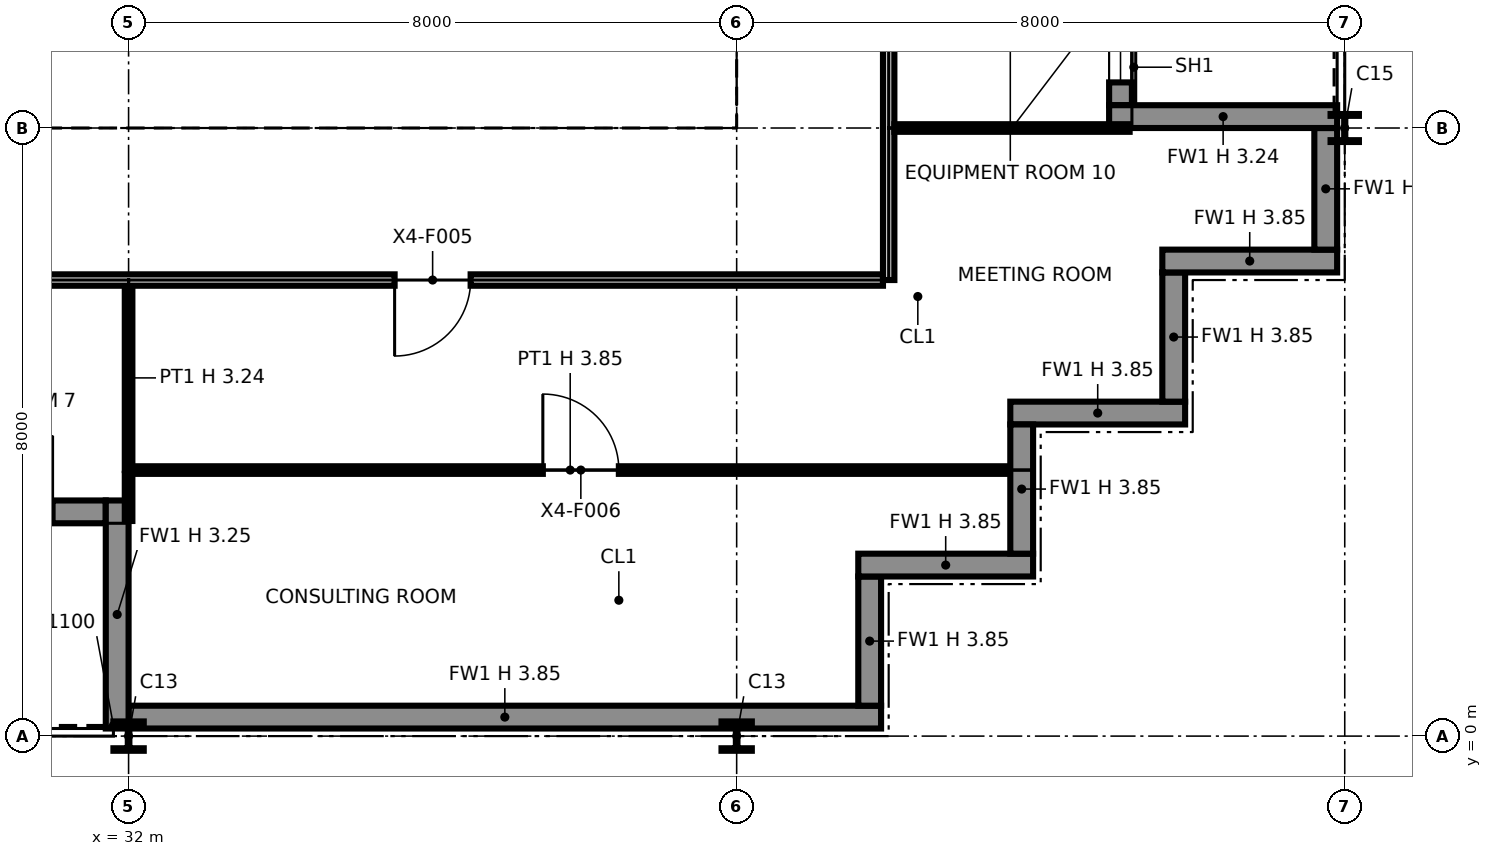
"""IFC4 building model, lengths in metres.
Left out: names, types, materials, properties, quantities, classifications, styles, units other than length and angle.
Written with IfcOpenShell. Run it as: python <this file> out.ifc"""

import sys

from ifc_helpers import new_model, si_unit, direction, frame, frame_2d, origin, origin_2d, place, context, subcontext, project, spatial, polyline, rectangle, i_section, outline, extrude, element, fill, save


model = new_model("IFC4")
c1 = context("Model", 3, precision=1e-05, world=origin(), true_north=direction((0.0, 1.0)))
c2 = subcontext(c1, "Body", "Model", "MODEL_VIEW")
j1 = project(units=[si_unit("LENGTHUNIT", "METRE"), si_unit("PLANEANGLEUNIT", "RADIAN")], contexts=[c1])
p1 = place(None, origin())
s1 = spatial("IfcSite", under=j1, at=p1, CompositionType="ELEMENT")
p2 = place(p1, origin())
s2 = spatial("IfcBuilding", under=s1, at=p2, CompositionType="ELEMENT")
p3 = place(p2, frame((0.0, 0.0, 275.0)))
s3 = spatial("IfcBuildingStorey", under=s2, at=p3, CompositionType="ELEMENT", Elevation=275.0)
p4 = place(p3, frame((32.0, 0.0, 0.0), z_axis=(0.0, 0.0, 1.0), x_axis=(1.0, 0.0, 0.0)))
e1 = element("IfcColumn", 1, at=p4, inside=s3, PredefinedType="COLUMN", context=c2, shape_type="SweptSolid", body=[
    extrude(i_section(OverallWidth=0.399, OverallDepth=0.386, WebThickness=0.021, FlangeThickness=0.033, at=origin_2d()), origin(), (0.0, 0.0, 1.0), 3.85),
])
p5 = place(p3, frame((32.0, 8.0, 0.0), z_axis=(0.0, 0.0, 1.0), x_axis=(1.0, 0.0, 0.0)))
e2 = element("IfcColumn", 2, at=p5, inside=s3, PredefinedType="COLUMN", context=c2, shape_type="SweptSolid", body=[
    extrude(i_section(OverallWidth=0.257, OverallDepth=0.363, WebThickness=0.013, FlangeThickness=0.022, at=origin_2d()), origin(), (0.0, 0.0, 1.0), 3.85),
])
p6 = place(p3, frame((40.0, 0.0, 0.0), z_axis=(0.0, 0.0, 1.0), x_axis=(1.0, 0.0, 0.0)))
e3 = element("IfcColumn", 3, at=p6, inside=s3, PredefinedType="COLUMN", context=c2, shape_type="SweptSolid", body=[
    extrude(i_section(OverallWidth=0.399, OverallDepth=0.386, WebThickness=0.021, FlangeThickness=0.033, at=origin_2d()), origin(), (0.0, 0.0, 1.0), 3.85),
])
p7 = place(p3, frame((40.0, 8.0, 0.0), z_axis=(0.0, 0.0, 1.0), x_axis=(1.0, 0.0, 0.0)))
e4 = element("IfcColumn", 4, at=p7, inside=s3, PredefinedType="COLUMN", context=c2, shape_type="SweptSolid", body=[
    extrude(i_section(OverallWidth=0.257, OverallDepth=0.363, WebThickness=0.013, FlangeThickness=0.022, at=origin_2d()), origin(), (0.0, 0.0, 1.0), 3.85),
])
p8 = place(p3, frame((48.0, 8.0, 0.0), z_axis=(0.0, 0.0, 1.0), x_axis=(1.0, 0.0, 0.0)))
e5 = element("IfcColumn", 5, at=p8, inside=s3, PredefinedType="COLUMN", context=c2, shape_type="SweptSolid", body=[
    extrude(i_section(OverallWidth=0.373, OverallDepth=0.368, WebThickness=0.015, FlangeThickness=0.024, at=origin_2d()), origin(), (0.0, 0.0, 1.0), 3.85),
])
p9 = place(p3, frame((24.3, 2.95, 0.0), z_axis=(0.0, 0.0, 1.0), x_axis=(1.0, 0.0, 0.0)))
e6 = element("IfcWall", 6, at=p9, inside=s3, PredefinedType="SOLIDWALL", context=c2, shape_type="SweptSolid", body=[
    extrude(rectangle(XDim=7.4, YDim=0.3, at=frame_2d((3.7, 0.0))), origin(), (0.0, 0.0, 1.0), 3.85),
])
p10 = place(p9, frame((0.3, 0.0, 0.9)))
e7 = element("IfcOpeningElement", 7, at=p10, cuts=e6, PredefinedType="OPENING", context=c2, shape_type="SweptSolid", body=[
    extrude(rectangle(XDim=2.8, YDim=2.2, at=frame_2d((1.4, 1.1))), frame((0.0, 0.16, 0.0), z_axis=(0.0, -1.0, 0.0), x_axis=(1.0, 0.0, 0.0)), (0.0, 0.0, 1.0), 0.32),
])
p11 = place(p9, frame((4.7, 0.0, 0.0)))
e8 = element("IfcOpeningElement", 8, at=p11, cuts=e6, PredefinedType="OPENING", context=c2, shape_type="SweptSolid", body=[
    extrude(rectangle(XDim=2.0, YDim=2.4, at=frame_2d((1.0, 1.2))), frame((0.0, 0.16, 0.0), z_axis=(0.0, -1.0, 0.0), x_axis=(1.0, 0.0, 0.0)), (0.0, 0.0, 1.0), 0.32),
])
p12 = place(p3, frame((31.85, 0.1, 0.0), z_axis=(0.0, 0.0, 1.0), x_axis=(0.0, 1.0, 0.0)))
e9 = element("IfcWall", 9, at=p12, inside=s3, PredefinedType="SOLIDWALL", context=c2, shape_type="SweptSolid", body=[
    extrude(rectangle(XDim=3.0, YDim=0.3, at=frame_2d((1.5, 0.0))), origin(), (0.0, 0.0, 1.0), 3.247),
])
p13 = place(p3, frame((32.0, 0.25, 0.0), z_axis=(0.0, 0.0, 1.0), x_axis=(1.0, 0.0, 0.0)))
e10 = element("IfcWall", 10, at=p13, inside=s3, PredefinedType="SOLIDWALL", context=c2, shape_type="SweptSolid", body=[
    extrude(rectangle(XDim=9.9, YDim=0.3, at=frame_2d((4.95, 0.0))), origin(), (0.0, 0.0, 1.0), 3.85),
])
p14 = place(p3, frame((41.75, 0.4, 0.0), z_axis=(0.0, 0.0, 1.0), x_axis=(0.0, 1.0, 0.0)))
e11 = element("IfcWall", 11, at=p14, inside=s3, PredefinedType="SOLIDWALL", context=c2, shape_type="SweptSolid", body=[
    extrude(rectangle(XDim=1.7, YDim=0.3, at=frame_2d((0.85, 0.0))), origin(), (0.0, 0.0, 1.0), 3.85),
])
p15 = place(p3, frame((41.6, 2.25, 0.0), z_axis=(0.0, 0.0, 1.0), x_axis=(1.0, 0.0, 0.0)))
e12 = element("IfcWall", 12, at=p15, inside=s3, PredefinedType="SOLIDWALL", context=c2, shape_type="SweptSolid", body=[
    extrude(rectangle(XDim=2.3, YDim=0.3, at=frame_2d((1.15, 0.0))), origin(), (0.0, 0.0, 1.0), 3.85),
])
p16 = place(p3, frame((43.75, 2.4, 0.0), z_axis=(0.0, 0.0, 1.0), x_axis=(0.0, 1.0, 0.0)))
e13 = element("IfcWall", 13, at=p16, inside=s3, PredefinedType="SOLIDWALL", context=c2, shape_type="SweptSolid", body=[
    extrude(rectangle(XDim=1.7, YDim=0.3, at=frame_2d((0.85, 0.0))), origin(), (0.0, 0.0, 1.0), 3.85),
])
p17 = place(p3, frame((43.6, 4.25, 0.0), z_axis=(0.0, 0.0, 1.0), x_axis=(1.0, 0.0, 0.0)))
e14 = element("IfcWall", 14, at=p17, inside=s3, PredefinedType="SOLIDWALL", context=c2, shape_type="SweptSolid", body=[
    extrude(rectangle(XDim=2.3, YDim=0.3, at=frame_2d((1.15, 0.0))), origin(), (0.0, 0.0, 1.0), 3.85),
])
p18 = place(p3, frame((45.75, 4.4, 0.0), z_axis=(0.0, 0.0, 1.0), x_axis=(0.0, 1.0, 0.0)))
e15 = element("IfcWall", 15, at=p18, inside=s3, PredefinedType="SOLIDWALL", context=c2, shape_type="SweptSolid", body=[
    extrude(rectangle(XDim=1.7, YDim=0.3, at=frame_2d((0.85, 0.0))), origin(), (0.0, 0.0, 1.0), 3.85),
])
p19 = place(p3, frame((45.6, 6.25, 0.0), z_axis=(0.0, 0.0, 1.0), x_axis=(1.0, 0.0, 0.0)))
e16 = element("IfcWall", 16, at=p19, inside=s3, PredefinedType="SOLIDWALL", context=c2, shape_type="SweptSolid", body=[
    extrude(rectangle(XDim=2.3, YDim=0.3, at=frame_2d((1.15, 0.0))), origin(), (0.0, 0.0, 1.0), 3.85),
])
p20 = place(p3, frame((47.75, 6.4, 0.0), z_axis=(0.0, 0.0, 1.0), x_axis=(0.0, 1.0, 0.0)))
e17 = element("IfcWall", 17, at=p20, inside=s3, PredefinedType="SOLIDWALL", context=c2, shape_type="SweptSolid", body=[
    extrude(rectangle(XDim=1.6, YDim=0.3, at=frame_2d((0.8, 0.0))), origin(), (0.0, 0.0, 1.0), 3.85),
])
p21 = place(p3, frame((45.05, 8.3, 0.0), z_axis=(0.0, 0.0, 1.0), x_axis=(0.0, 1.0, 0.0)))
e18 = element("IfcWall", 18, at=p21, inside=s3, PredefinedType="SOLIDWALL", context=c2, shape_type="SweptSolid", body=[
    extrude(rectangle(XDim=7.4, YDim=0.3, at=frame_2d((3.7, 0.0))), origin(), (0.0, 0.0, 1.0), 3.85),
])
p22 = place(p21, frame((0.3, 0.0, 0.9)))
e19 = element("IfcOpeningElement", 19, at=p22, cuts=e18, PredefinedType="OPENING", context=c2, shape_type="SweptSolid", body=[
    extrude(rectangle(XDim=2.8, YDim=2.2, at=frame_2d((1.4, 1.1))), frame((0.0, 0.16, 0.0), z_axis=(0.0, -1.0, 0.0), x_axis=(1.0, 0.0, 0.0)), (0.0, 0.0, 1.0), 0.32),
])
p23 = place(p21, frame((4.7, 0.0, 0.0)))
e20 = element("IfcOpeningElement", 20, at=p23, cuts=e18, PredefinedType="OPENING", context=c2, shape_type="SweptSolid", body=[
    extrude(rectangle(XDim=2.0, YDim=2.4, at=frame_2d((1.0, 1.2))), frame((0.0, 0.16, 0.0), z_axis=(0.0, -1.0, 0.0), x_axis=(1.0, 0.0, 0.0)), (0.0, 0.0, 1.0), 0.32),
])
p24 = place(p3, frame((47.9, 8.15, 0.0), z_axis=(0.0, 0.0, 1.0), x_axis=(-1.0, 0.0, 0.0)))
e21 = element("IfcWall", 21, at=p24, inside=s3, PredefinedType="SOLIDWALL", context=c2, shape_type="SweptSolid", body=[
    extrude(rectangle(XDim=3.0, YDim=0.3, at=frame_2d((1.5, 0.0))), origin(), (0.0, 0.0, 1.0), 3.237),
])
p25 = place(p3, frame((24.65, 8.75, 0.0), z_axis=(0.0, 0.0, 1.0), x_axis=(1.0, 0.0, 0.0)))
e22 = element("IfcWall", 22, at=p25, inside=s3, PredefinedType="PARTITIONING", context=c2, shape_type="SweptSolid", body=[
    extrude(outline(polyline([(0.0, 0.0), (14.7, 0.0), (14.7, 3.85), (7.438, 3.85), (7.437, 3.318), (7.263, 3.318), (7.262, 3.85), (0.0, 3.85), (0.0, 0.0)])), frame((0.0, 0.1, 0.0), z_axis=(0.0, -1.0, 0.0), x_axis=(1.0, 0.0, 0.0)), (0.0, 0.0, 1.0), 0.2),
])
p26 = place(p3, frame((32.0, 8.85, 0.0), z_axis=(0.0, 0.0, 1.0), x_axis=(0.0, 1.0, 0.0)))
e23 = element("IfcWall", 23, at=p26, inside=s3, PredefinedType="PARTITIONING", context=c2, shape_type="SweptSolid", body=[
    extrude(rectangle(XDim=2.55, YDim=0.6, at=frame_2d((1.275, 0.0))), origin(), (0.0, 0.0, 1.0), 3.318),
])
for number, where, z_axis, x_axis in (
    (24, (35.6, 8.85, 0.0), (0.0, 0.0, 1.0), (0.0, 1.0, 0.0)),
    (25, (39.25, 8.85, 0.0), (0.0, 0.0, 1.0), (0.0, 1.0, 0.0)),
):
    element("IfcWall", number, at=place(p3, frame(where, z_axis=z_axis, x_axis=x_axis)), inside=s3, PredefinedType="PARTITIONING", context=c2, shape_type="SweptSolid", body=[
        extrude(rectangle(XDim=6.3, YDim=0.2, at=frame_2d((3.15, 0.0))), origin(), (0.0, 0.0, 1.0), 3.85),
    ])
p27 = place(p3, frame((32.0, 2.83, 0.0), z_axis=(0.0, 0.0, 1.0), x_axis=(0.0, 1.0, 0.0)))
e26 = element("IfcWall", 26, at=p27, inside=s3, PredefinedType="PARTITIONING", context=c2, shape_type="SweptSolid", body=[
    extrude(rectangle(XDim=0.62, YDim=0.1, at=frame_2d((0.31, 0.0))), origin(), (0.0, 0.0, 1.0), 3.238),
])
p28 = place(p3, frame((32.05, 3.5, 0.0), z_axis=(0.0, 0.0, 1.0), x_axis=(1.0, 0.0, 0.0)))
e27 = element("IfcWall", 27, at=p28, inside=s3, PredefinedType="PARTITIONING", context=c2, shape_type="SweptSolid", body=[
    extrude(rectangle(XDim=11.52, YDim=0.1, at=frame_2d((5.76, 0.0))), origin(), (0.0, 0.0, 1.0), 3.85),
])
p29 = place(p28, frame((5.4, 0.0, 0.0)))
e28 = element("IfcOpeningElement", 28, at=p29, cuts=e27, PredefinedType="OPENING", context=c2, shape_type="SweptSolid", body=[
    extrude(rectangle(XDim=1.0, YDim=2.1, at=frame_2d((0.5, 1.05))), frame((0.0, 0.06, 0.0), z_axis=(0.0, -1.0, 0.0), x_axis=(1.0, 0.0, 0.0)), (0.0, 0.0, 1.0), 0.12),
])
p30 = place(p3, frame((32.0, 3.5, 0.0), z_axis=(0.0, 0.0, 1.0), x_axis=(0.0, 1.0, 0.0)))
e29 = element("IfcWall", 29, at=p30, inside=s3, PredefinedType="PARTITIONING", context=c2, shape_type="SweptSolid", body=[
    extrude(rectangle(XDim=2.425, YDim=0.1, at=frame_2d((1.212, 0.0))), origin(), (0.0, 0.0, 1.0), 3.238),
])
p31 = place(p3, frame((6.075, 6.0, 0.0), z_axis=(0.0, 0.0, 1.0), x_axis=(1.0, 0.0, 0.0)))
e30 = element("IfcWall", 30, at=p31, inside=s3, PredefinedType="PARTITIONING", context=c2, shape_type="SweptSolid", body=[
    extrude(rectangle(XDim=35.85, YDim=0.15, at=frame_2d((17.925, 0.0))), origin(), (0.0, 0.0, 1.0), 3.85),
])
p32 = place(p31, frame((12.425, 0.0, 0.0), z_axis=(0.0, 0.0, 1.0), x_axis=(-1.0, 0.0, 0.0)))
e31 = element("IfcOpeningElement", 31, at=p32, cuts=e30, PredefinedType="OPENING", context=c2, shape_type="SweptSolid", body=[
    extrude(rectangle(XDim=1.0, YDim=2.1, at=frame_2d((0.5, 1.05))), frame((0.0, 0.085, 0.0), z_axis=(0.0, -1.0, 0.0), x_axis=(1.0, 0.0, 0.0)), (0.0, 0.0, 1.0), 0.17),
])
p33 = place(p31, frame((16.425, 0.0, 0.0), z_axis=(0.0, 0.0, 1.0), x_axis=(-1.0, 0.0, 0.0)))
e32 = element("IfcOpeningElement", 32, at=p33, cuts=e30, PredefinedType="OPENING", context=c2, shape_type="SweptSolid", body=[
    extrude(rectangle(XDim=1.0, YDim=2.1, at=frame_2d((0.5, 1.05))), frame((0.0, 0.085, 0.0), z_axis=(0.0, -1.0, 0.0), x_axis=(1.0, 0.0, 0.0)), (0.0, 0.0, 1.0), 0.17),
])
p34 = place(p31, frame((30.425, 0.0, 0.0), z_axis=(0.0, 0.0, 1.0), x_axis=(-1.0, 0.0, 0.0)))
e33 = element("IfcOpeningElement", 33, at=p34, cuts=e30, PredefinedType="OPENING", context=c2, shape_type="SweptSolid", body=[
    extrude(rectangle(XDim=1.0, YDim=2.1, at=frame_2d((0.5, 1.05))), frame((0.0, 0.085, 0.0), z_axis=(0.0, -1.0, 0.0), x_axis=(1.0, 0.0, 0.0)), (0.0, 0.0, 1.0), 0.17),
])
p35 = place(p31, frame((4.425, 0.0, 0.0), z_axis=(0.0, 0.0, 1.0), x_axis=(-1.0, 0.0, 0.0)))
e34 = element("IfcOpeningElement", 34, at=p35, cuts=e30, PredefinedType="OPENING", context=c2, shape_type="SweptSolid", body=[
    extrude(rectangle(XDim=1.0, YDim=2.1, at=frame_2d((0.5, 1.05))), frame((0.0, 0.085, 0.0), z_axis=(0.0, -1.0, 0.0), x_axis=(1.0, 0.0, 0.0)), (0.0, 0.0, 1.0), 0.17),
])
p36 = place(p31, frame((8.425, 0.0, 0.0), z_axis=(0.0, 0.0, 1.0), x_axis=(-1.0, 0.0, 0.0)))
e35 = element("IfcOpeningElement", 35, at=p36, cuts=e30, PredefinedType="OPENING", context=c2, shape_type="SweptSolid", body=[
    extrude(rectangle(XDim=1.0, YDim=2.1, at=frame_2d((0.5, 1.05))), frame((0.0, 0.085, 0.0), z_axis=(0.0, -1.0, 0.0), x_axis=(1.0, 0.0, 0.0)), (0.0, 0.0, 1.0), 0.17),
])
p37 = place(p31, frame((19.425, 0.0, 0.0), z_axis=(0.0, 0.0, 1.0), x_axis=(-1.0, 0.0, 0.0)))
e36 = element("IfcOpeningElement", 36, at=p37, cuts=e30, PredefinedType="OPENING", context=c2, shape_type="SweptSolid", body=[
    extrude(rectangle(XDim=1.0, YDim=2.1, at=frame_2d((0.5, 1.05))), frame((0.0, 0.085, 0.0), z_axis=(0.0, -1.0, 0.0), x_axis=(1.0, 0.0, 0.0)), (0.0, 0.0, 1.0), 0.17),
])
p38 = place(p31, frame((24.425, 0.0, 0.0), z_axis=(0.0, 0.0, 1.0), x_axis=(-1.0, 0.0, 0.0)))
e37 = element("IfcOpeningElement", 37, at=p38, cuts=e30, PredefinedType="OPENING", context=c2, shape_type="SweptSolid", body=[
    extrude(rectangle(XDim=1.0, YDim=2.1, at=frame_2d((0.5, 1.05))), frame((0.0, 0.085, 0.0), z_axis=(0.0, -1.0, 0.0), x_axis=(1.0, 0.0, 0.0)), (0.0, 0.0, 1.0), 0.17),
])
p39 = place(p3, frame((42.0, 6.0, 0.0), z_axis=(0.0, 0.0, 1.0), x_axis=(0.0, 1.0, 0.0)))
e38 = element("IfcWall", 38, at=p39, inside=s3, PredefinedType="PARTITIONING", context=c2, shape_type="SweptSolid", body=[
    extrude(outline(polyline([(0.0, 0.0), (11.925, 0.0), (11.925, 3.85), (10.3, 3.85), (10.298, 3.238), (9.702, 3.238), (9.7, 3.85), (6.3, 3.85), (6.298, 3.238), (5.702, 3.238), (5.7, 3.85), (2.3, 3.85), (2.298, 3.238), (1.702, 3.238), (1.7, 3.85), (0.0, 3.85), (0.0, 0.0)])), frame((0.0, 0.075, 0.0), z_axis=(0.0, -1.0, 0.0), x_axis=(1.0, 0.0, 0.0)), (0.0, 0.0, 1.0), 0.15),
])
p40 = place(p39, frame((4.5, 0.0, 0.0), z_axis=(0.0, 0.0, 1.0), x_axis=(-1.0, 0.0, 0.0)))
e39 = element("IfcOpeningElement", 39, at=p40, cuts=e38, PredefinedType="OPENING", context=c2, shape_type="SweptSolid", body=[
    extrude(rectangle(XDim=1.0, YDim=2.1, at=frame_2d((0.5, 1.05))), frame((0.0, 0.085, 0.0), z_axis=(0.0, -1.0, 0.0), x_axis=(1.0, 0.0, 0.0)), (0.0, 0.0, 1.0), 0.17),
])
p41 = place(p39, frame((8.5, 0.0, 0.0), z_axis=(0.0, 0.0, 1.0), x_axis=(-1.0, 0.0, 0.0)))
e40 = element("IfcOpeningElement", 40, at=p41, cuts=e38, PredefinedType="OPENING", context=c2, shape_type="SweptSolid", body=[
    extrude(rectangle(XDim=1.0, YDim=2.1, at=frame_2d((0.5, 1.05))), frame((0.0, 0.085, 0.0), z_axis=(0.0, -1.0, 0.0), x_axis=(1.0, 0.0, 0.0)), (0.0, 0.0, 1.0), 0.17),
])
p42 = place(p39, frame((11.5, 0.0, 0.0), z_axis=(0.0, 0.0, 1.0), x_axis=(-1.0, 0.0, 0.0)))
e41 = element("IfcOpeningElement", 41, at=p42, cuts=e38, PredefinedType="OPENING", context=c2, shape_type="SweptSolid", body=[
    extrude(rectangle(XDim=1.0, YDim=2.1, at=frame_2d((0.5, 1.05))), frame((0.0, 0.085, 0.0), z_axis=(0.0, -1.0, 0.0), x_axis=(1.0, 0.0, 0.0)), (0.0, 0.0, 1.0), 0.17),
])
p43 = place(p3, frame((42.075, 8.0, 0.0), z_axis=(0.0, 0.0, 1.0), x_axis=(1.0, 0.0, 0.0)))
e42 = element("IfcWall", 42, at=p43, inside=s3, PredefinedType="PARTITIONING", context=c2, shape_type="SweptSolid", body=[
    extrude(rectangle(XDim=3.095, YDim=0.1, at=frame_2d((1.547, 0.0))), origin(), (0.0, 0.0, 1.0), 3.238),
])
p44 = place(p22, origin())
e43 = element("IfcWindow", 43, at=p44, inside=s3, PartitioningType="SINGLE_PANEL", PredefinedType="WINDOW", context=c2, shape_type="SweptSolid", body=[
    extrude(rectangle(XDim=2.8, YDim=2.2, at=frame_2d((1.4, 1.1))), frame((0.0, 0.03, 0.0), z_axis=(0.0, -1.0, 0.0), x_axis=(1.0, 0.0, 0.0)), (0.0, 0.0, 1.0), 0.06),
])
fill(e19, e43)
p45 = place(p34, origin())
e44 = element("IfcDoor", 44, at=p45, inside=s3, OperationType="SINGLE_SWING_RIGHT", PredefinedType="DOOR", context=c2, shape_type="SweptSolid", body=[
    extrude(rectangle(XDim=1.0, YDim=2.1, at=frame_2d((0.5, 1.05))), frame((0.0, 0.025, 0.0), z_axis=(0.0, -1.0, 0.0), x_axis=(1.0, 0.0, 0.0)), (0.0, 0.0, 1.0), 0.05),
])
fill(e33, e44)
p46 = place(p29, origin())
e45 = element("IfcDoor", 45, at=p46, inside=s3, OperationType="SINGLE_SWING_LEFT", PredefinedType="DOOR", context=c2, shape_type="SweptSolid", body=[
    extrude(rectangle(XDim=1.0, YDim=2.1, at=frame_2d((0.5, 1.05))), frame((0.0, 0.025, 0.0), z_axis=(0.0, -1.0, 0.0), x_axis=(1.0, 0.0, 0.0)), (0.0, 0.0, 1.0), 0.05),
])
fill(e28, e45)
save(model, sys.argv[1])
